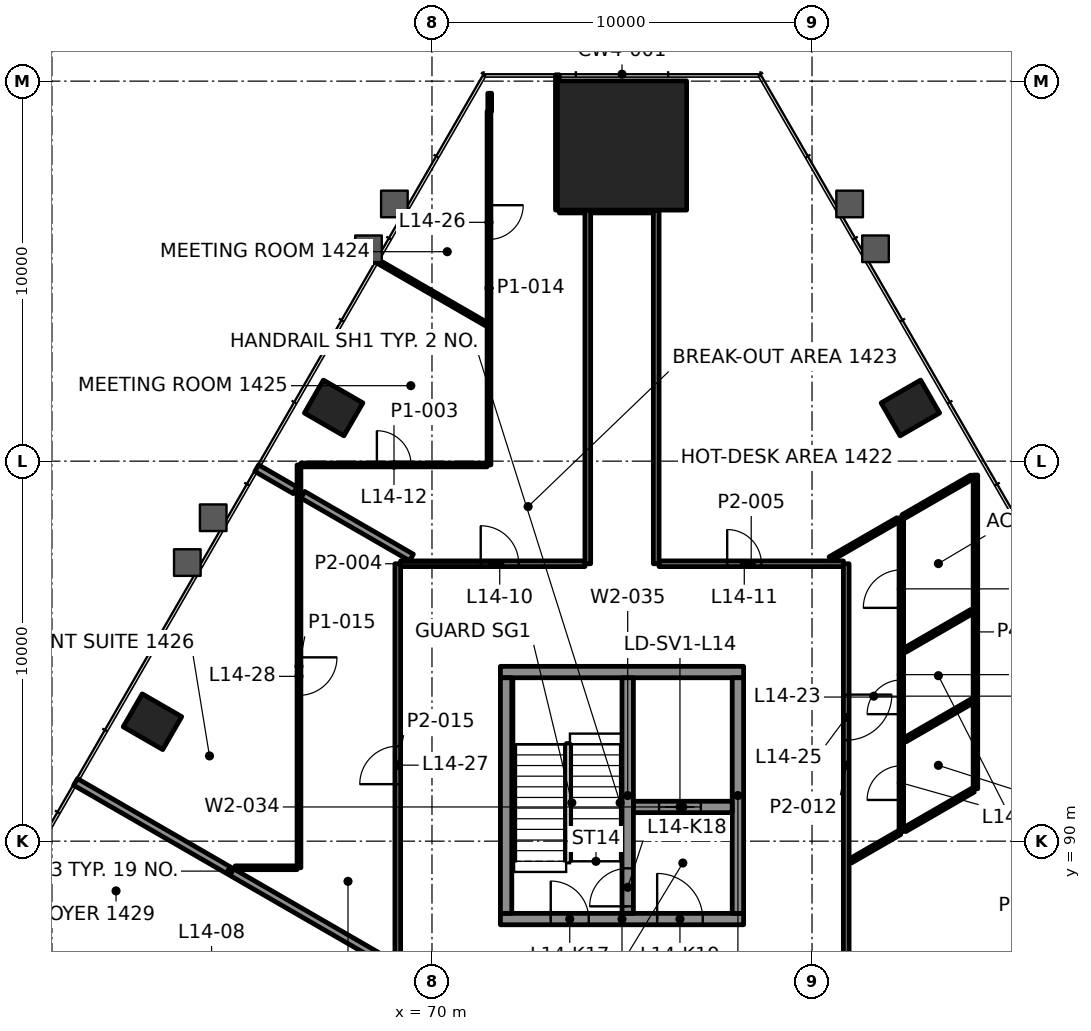
"""IFC4 building model, lengths in metres.
Left out: names, types, materials, properties, quantities, classifications, styles, units other than length and angle.
Written with IfcOpenShell. Run it as: python <this file> out.ifc"""

import sys

from ifc_helpers import new_model, si_unit, direction, frame, frame_2d, origin, origin_2d, place, context, subcontext, project, spatial, rectangle, extrude, element, fill, save


model = new_model("IFC4")
c1 = context("Model", 3, precision=1e-05, world=origin(), true_north=direction((0.0, 1.0)))
c2 = subcontext(c1, "Body", "Model", "MODEL_VIEW")
j1 = project(units=[si_unit("LENGTHUNIT", "METRE"), si_unit("PLANEANGLEUNIT", "RADIAN")], contexts=[c1])
p1 = place(None, origin())
s1 = spatial("IfcSite", under=j1, at=p1, CompositionType="ELEMENT")
p2 = place(p1, origin())
s2 = spatial("IfcBuilding", under=s1, at=p2, CompositionType="ELEMENT")
p3 = place(p2, frame((0.0, 0.0, 65.2)))
s3 = spatial("IfcBuildingStorey", under=s2, at=p3, CompositionType="ELEMENT", Elevation=65.2)
p4 = place(p3, frame((75.0, 108.307, 0.0), z_axis=(0.0, 0.0, 1.0), x_axis=(-1.0, 0.0, 0.0)))
e1 = element("IfcColumn", 1, at=p4, inside=s3, PredefinedType="COLUMN", context=c2, shape_type="SweptSolid", body=[
    extrude(rectangle(XDim=3.4, YDim=3.4, at=origin_2d()), origin(), (0.0, 0.0, 1.0), 4.2),
])
for number, where, z_axis, x_axis in (
    (2, (82.588, 101.4, -0.0), (0.0, 0.0, 1.0), (-0.5, 0.866, 0.0)),
    (3, (67.412, 101.4, -0.0), (0.0, 0.0, 1.0), (-0.5, -0.866, 0.0)),
    (4, (62.645, 93.143, -0.0), (0.0, 0.0, 1.0), (-0.5, -0.866, 0.0)),
):
    element("IfcColumn", number, at=place(p3, frame(where, z_axis=z_axis, x_axis=x_axis)), inside=s3, PredefinedType="COLUMN", context=c2, shape_type="SweptSolid", body=[
        extrude(rectangle(XDim=1.0, YDim=1.2, at=origin_2d()), origin(), (0.0, 0.0, 1.0), 4.2),
    ])
p5 = place(p3, frame((71.8, 87.95, 0.0), z_axis=(0.0, 0.0, 1.0), x_axis=(1.0, 0.0, 0.0)))
e5 = element("IfcWall", 5, at=p5, inside=s3, PredefinedType="SHEAR", context=c2, shape_type="SweptSolid", body=[
    extrude(rectangle(XDim=6.4, YDim=0.3, at=frame_2d((3.2, 0.0))), origin(), (0.0, 0.0, 1.0), 4.0),
])
p6 = place(p5, frame((1.325, 0.0, 0.0)))
e6 = element("IfcOpeningElement", 6, at=p6, cuts=e5, PredefinedType="OPENING", context=c2, shape_type="SweptSolid", body=[
    extrude(rectangle(XDim=1.0, YDim=2.1, at=frame_2d((0.5, 1.05))), frame((0.0, 0.16, 0.0), z_axis=(0.0, -1.0, 0.0), x_axis=(1.0, 0.0, 0.0)), (0.0, 0.0, 1.0), 0.32),
])
p7 = place(p5, frame((4.125, 0.0, 0.0)))
e7 = element("IfcOpeningElement", 7, at=p7, cuts=e5, PredefinedType="OPENING", context=c2, shape_type="SweptSolid", body=[
    extrude(rectangle(XDim=1.2, YDim=2.1, at=frame_2d((0.6, 1.05))), frame((0.0, 0.16, 0.0), z_axis=(0.0, -1.0, 0.0), x_axis=(1.0, 0.0, 0.0)), (0.0, 0.0, 1.0), 0.32),
])
p8 = place(p3, frame((71.8, 94.45, 0.0), z_axis=(0.0, 0.0, 1.0), x_axis=(1.0, 0.0, 0.0)))
e8 = element("IfcWall", 8, at=p8, inside=s3, PredefinedType="SHEAR", context=c2, shape_type="SweptSolid", body=[
    extrude(rectangle(XDim=6.4, YDim=0.3, at=frame_2d((3.2, 0.0))), origin(), (0.0, 0.0, 1.0), 4.0),
])
for number, where, z_axis, x_axis in (
    (9, (71.95, 88.1, 0.0), (0.0, 0.0, 1.0), (0.0, 1.0, 0.0)),
    (10, (78.05, 88.1, 0.0), (0.0, 0.0, 1.0), (0.0, 1.0, 0.0)),
):
    element("IfcWall", number, at=place(p3, frame(where, z_axis=z_axis, x_axis=x_axis)), inside=s3, PredefinedType="SHEAR", context=c2, shape_type="SweptSolid", body=[
        extrude(rectangle(XDim=6.2, YDim=0.3, at=frame_2d((3.1, 0.0))), origin(), (0.0, 0.0, 1.0), 4.0),
    ])
p9 = place(p3, frame((75.3, 90.9, 0.0), z_axis=(0.0, 0.0, 1.0), x_axis=(1.0, 0.0, 0.0)))
e11 = element("IfcWall", 11, at=p9, inside=s3, PredefinedType="SHEAR", context=c2, shape_type="SweptSolid", body=[
    extrude(rectangle(XDim=2.6, YDim=0.3, at=frame_2d((1.3, 0.0))), origin(), (0.0, 0.0, 1.0), 4.0),
])
p10 = place(p9, frame((0.675, 0.0, 0.0)))
e12 = element("IfcOpeningElement", 12, at=p10, cuts=e11, PredefinedType="OPENING", context=c2, shape_type="SweptSolid", body=[
    extrude(rectangle(XDim=1.1, YDim=2.1, at=frame_2d((0.55, 1.05))), frame((0.0, 0.16, 0.0), z_axis=(0.0, -1.0, 0.0), x_axis=(1.0, 0.0, 0.0)), (0.0, 0.0, 1.0), 0.32),
])
p11 = place(p3, frame((75.15, 88.1, 0.0), z_axis=(0.0, 0.0, 1.0), x_axis=(0.0, 1.0, 0.0)))
e13 = element("IfcWall", 13, at=p11, inside=s3, PredefinedType="SHEAR", context=c2, shape_type="SweptSolid", body=[
    extrude(rectangle(XDim=6.2, YDim=0.3, at=frame_2d((3.1, 0.0))), origin(), (0.0, 0.0, 1.0), 4.0),
])
p12 = place(p11, frame((0.185, 0.0, 0.0)))
e14 = element("IfcOpeningElement", 14, at=p12, cuts=e13, PredefinedType="OPENING", context=c2, shape_type="SweptSolid", body=[
    extrude(rectangle(XDim=1.0, YDim=2.1, at=frame_2d((0.5, 1.05))), frame((0.0, 0.16, 0.0), z_axis=(0.0, -1.0, 0.0), x_axis=(1.0, 0.0, 0.0)), (0.0, 0.0, 1.0), 0.32),
])
p13 = place(p3, frame((64.823, 89.3, 0.0), z_axis=(0.0, 0.0, 1.0), x_axis=(1.0, 0.0, 0.0)))
e15 = element("IfcWall", 15, at=p13, inside=s3, PredefinedType="PARTITIONING", context=c2, shape_type="SweptSolid", body=[
    extrude(rectangle(XDim=1.627, YDim=0.1, at=frame_2d((0.813, 0.0))), origin(), (0.0, 0.0, 1.0), 3.4),
])
p14 = place(p3, frame((69.175, 97.3, 0.0), z_axis=(0.0, 0.0, 1.0), x_axis=(1.0, 0.0, 0.0)))
e16 = element("IfcWall", 16, at=p14, inside=s3, PredefinedType="PARTITIONING", context=c2, shape_type="SweptSolid", body=[
    extrude(rectangle(XDim=4.85, YDim=0.15, at=frame_2d((2.425, 0.0))), origin(), (0.0, 0.0, 1.0), 3.4),
])
p15 = place(p14, frame((2.107, 0.0, 0.0)))
e17 = element("IfcOpeningElement", 17, at=p15, cuts=e16, PredefinedType="OPENING", context=c2, shape_type="SweptSolid", body=[
    extrude(rectangle(XDim=1.0, YDim=2.1, at=frame_2d((0.5, 1.05))), frame((0.0, 0.085, 0.0), z_axis=(0.0, -1.0, 0.0), x_axis=(1.0, 0.0, 0.0)), (0.0, 0.0, 1.0), 0.17),
])
p16 = place(p3, frame((75.975, 97.3, 0.0), z_axis=(0.0, 0.0, 1.0), x_axis=(1.0, 0.0, 0.0)))
e18 = element("IfcWall", 18, at=p16, inside=s3, PredefinedType="PARTITIONING", context=c2, shape_type="SweptSolid", body=[
    extrude(rectangle(XDim=4.85, YDim=0.15, at=frame_2d((2.425, 0.0))), origin(), (0.0, 0.0, 1.0), 3.4),
])
p17 = place(p16, frame((1.792, 0.0, 0.0)))
e19 = element("IfcOpeningElement", 19, at=p17, cuts=e18, PredefinedType="OPENING", context=c2, shape_type="SweptSolid", body=[
    extrude(rectangle(XDim=0.9, YDim=2.1, at=frame_2d((0.45, 1.05))), frame((0.0, 0.085, 0.0), z_axis=(0.0, -1.0, 0.0), x_axis=(1.0, 0.0, 0.0)), (0.0, 0.0, 1.0), 0.17),
])
p18 = place(p3, frame((66.551, 99.9, 0.0), z_axis=(0.0, 0.0, 1.0), x_axis=(1.0, 0.0, 0.0)))
e20 = element("IfcWall", 20, at=p18, inside=s3, PredefinedType="PARTITIONING", context=c2, shape_type="SweptSolid", body=[
    extrude(rectangle(XDim=4.899, YDim=0.1, at=frame_2d((2.45, 0.0))), origin(), (0.0, 0.0, 1.0), 3.165),
])
p19 = place(p18, frame((2.0, 0.0, 0.0)))
e21 = element("IfcOpeningElement", 21, at=p19, cuts=e20, PredefinedType="OPENING", context=c2, shape_type="SweptSolid", body=[
    extrude(rectangle(XDim=0.9, YDim=2.1, at=frame_2d((0.45, 1.05))), frame((0.0, 0.06, 0.0), z_axis=(0.0, -1.0, 0.0), x_axis=(1.0, 0.0, 0.0)), (0.0, 0.0, 1.0), 0.12),
])
p20 = place(p3, frame((73.351, 106.607, 0.0), z_axis=(0.0, 0.0, 1.0), x_axis=(1.0, 0.0, 0.0)))
e22 = element("IfcWall", 22, at=p20, inside=s3, PredefinedType="PARTITIONING", context=c2, shape_type="SweptSolid", body=[
    extrude(rectangle(XDim=0.674, YDim=0.15, at=frame_2d((0.337, 0.0))), origin(), (0.0, 0.0, 1.0), 3.4),
])
p21 = place(p3, frame((81.01, 89.479, 0.0), z_axis=(0.0, 0.0, 1.0), x_axis=(0.866055123991, 0.49994851956, 0.0)))
e23 = element("IfcWall", 23, at=p21, inside=s3, PredefinedType="PARTITIONING", context=c2, shape_type="SweptSolid", body=[
    extrude(rectangle(XDim=1.496, YDim=0.12, at=frame_2d((0.748, 0.0))), origin(), (0.0, 0.0, 1.0), 3.4),
])
for number, where, z_axis, x_axis in (
    (24, (82.445, 92.666, 0.0), (0.0, 0.0, 1.0), (0.866, 0.5, 0.0)),
    (25, (82.444, 95.026, 0.0), (0.0, 0.0, 1.0), (0.866, 0.5, 0.0)),
):
    element("IfcWall", number, at=place(p3, frame(where, z_axis=z_axis, x_axis=x_axis)), inside=s3, PredefinedType="PARTITIONING", context=c2, shape_type="SweptSolid", body=[
        extrude(rectangle(XDim=2.033, YDim=0.12, at=frame_2d((1.017, 0.0))), origin(), (0.0, 0.0, 1.0), 3.4),
    ])
p22 = place(p3, frame((80.479, 97.43, 0.0), z_axis=(0.0, 0.0, 1.0), x_axis=(0.866057052383, 0.499945179012, 0.0)))
e26 = element("IfcWall", 26, at=p22, inside=s3, PredefinedType="PARTITIONING", context=c2, shape_type="SweptSolid", body=[
    extrude(rectangle(XDim=2.056, YDim=0.12, at=frame_2d((1.028, 0.0))), origin(), (0.0, 0.0, 1.0), 3.4),
])
p23 = place(p3, frame((84.3, 91.379, 0.0), z_axis=(0.0, 0.0, 1.0), x_axis=(0.0, 1.0, 0.0)))
e27 = element("IfcWall", 27, at=p23, inside=s3, PredefinedType="PARTITIONING", context=c2, shape_type="SweptSolid", body=[
    extrude(rectangle(XDim=8.255, YDim=0.12, at=frame_2d((4.127, 0.0))), origin(), (0.0, 0.0, 1.0), 3.165),
])
p24 = place(p3, frame((82.35, 90.253, 0.0), z_axis=(0.0, 0.0, 1.0), x_axis=(0.0, 1.0, 0.0)))
e28 = element("IfcWall", 28, at=p24, inside=s3, PredefinedType="PARTITIONING", context=c2, shape_type="SweptSolid", body=[
    extrude(rectangle(XDim=8.257, YDim=0.12, at=frame_2d((4.128, 0.0))), origin(), (0.0, 0.0, 1.0), 3.4),
])
p25 = place(p24, frame((0.831, 0.0, 0.0)))
e29 = element("IfcOpeningElement", 29, at=p25, cuts=e28, PredefinedType="OPENING", context=c2, shape_type="SweptSolid", body=[
    extrude(rectangle(XDim=0.9, YDim=2.1, at=frame_2d((0.45, 1.05))), frame((0.0, 0.07, 0.0), z_axis=(0.0, -1.0, 0.0), x_axis=(1.0, 0.0, 0.0)), (0.0, 0.0, 1.0), 0.14),
])
p26 = place(p24, frame((3.089, 0.0, 0.0)))
e30 = element("IfcOpeningElement", 30, at=p26, cuts=e28, PredefinedType="OPENING", context=c2, shape_type="SweptSolid", body=[
    extrude(rectangle(XDim=0.9, YDim=2.1, at=frame_2d((0.45, 1.05))), frame((0.0, 0.07, 0.0), z_axis=(0.0, -1.0, 0.0), x_axis=(1.0, 0.0, 0.0)), (0.0, 0.0, 1.0), 0.14),
])
p27 = place(p24, frame((5.886, 0.0, 0.0)))
e31 = element("IfcOpeningElement", 31, at=p27, cuts=e28, PredefinedType="OPENING", context=c2, shape_type="SweptSolid", body=[
    extrude(rectangle(XDim=1.0, YDim=2.1, at=frame_2d((0.5, 1.05))), frame((0.0, 0.07, 0.0), z_axis=(0.0, -1.0, 0.0), x_axis=(1.0, 0.0, 0.0)), (0.0, 0.0, 1.0), 0.14),
])
p28 = place(p3, frame((80.9, 97.3, 0.0), z_axis=(0.0, 0.0, 1.0), x_axis=(0.0, -1.0, 0.0)))
e32 = element("IfcWall", 32, at=p28, inside=s3, PredefinedType="PARTITIONING", context=c2, shape_type="SweptSolid", body=[
    extrude(rectangle(XDim=10.6, YDim=0.15, at=frame_2d((5.3, 0.0))), origin(), (0.0, 0.0, 1.0), 3.4),
])
p29 = place(p28, frame((3.444, 0.0, 0.0)))
e33 = element("IfcOpeningElement", 33, at=p29, cuts=e32, PredefinedType="OPENING", context=c2, shape_type="SweptSolid", body=[
    extrude(rectangle(XDim=1.2, YDim=2.1, at=frame_2d((0.6, 1.05))), frame((0.0, 0.085, 0.0), z_axis=(0.0, -1.0, 0.0), x_axis=(1.0, 0.0, 0.0)), (0.0, 0.0, 1.0), 0.17),
])
p30 = place(p3, frame((75.9, 97.3, 0.0), z_axis=(0.0, 0.0, 1.0), x_axis=(0.0, 1.0, 0.0)))
e34 = element("IfcWall", 34, at=p30, inside=s3, PredefinedType="PARTITIONING", context=c2, shape_type="SweptSolid", body=[
    extrude(rectangle(XDim=9.306, YDim=0.15, at=frame_2d((4.653, 0.0))), origin(), (0.0, 0.0, 1.0), 3.4),
])
p31 = place(p3, frame((74.1, 97.3, 0.0), z_axis=(0.0, 0.0, 1.0), x_axis=(0.0, 1.0, 0.0)))
e35 = element("IfcWall", 35, at=p31, inside=s3, PredefinedType="PARTITIONING", context=c2, shape_type="SweptSolid", body=[
    extrude(rectangle(XDim=9.307, YDim=0.15, at=frame_2d((4.653, 0.0))), origin(), (0.0, 0.0, 1.0), 3.4),
])
p32 = place(p3, frame((73.3, 106.607, 0.0), z_axis=(0.0, 0.0, 1.0), x_axis=(0.0, 1.0, 0.0)))
e36 = element("IfcWall", 36, at=p32, inside=s3, PredefinedType="PARTITIONING", context=c2, shape_type="SweptSolid", body=[
    extrude(rectangle(XDim=3.56, YDim=0.1, at=frame_2d((1.78, 0.0))), origin(), (0.0, 0.0, 1.0), 3.4),
])
p33 = place(p3, frame((71.519, 109.207, 0.0), z_axis=(0.0, 0.0, 1.0), x_axis=(0.0, 1.0, 0.0)))
e37 = element("IfcWall", 37, at=p33, inside=s3, PredefinedType="PARTITIONING", context=c2, shape_type="SweptSolid", body=[
    extrude(rectangle(XDim=0.473, YDim=0.1, at=frame_2d((0.237, 0.0))), origin(), (0.0, 0.0, 1.0), 3.4),
])
p34 = place(p3, frame((71.5, 109.206, 0.0), z_axis=(0.0, 0.0, 1.0), x_axis=(0.0, -1.0, 0.0)))
e38 = element("IfcWall", 38, at=p34, inside=s3, PredefinedType="PARTITIONING", context=c2, shape_type="SweptSolid", body=[
    extrude(rectangle(XDim=9.306, YDim=0.1, at=frame_2d((4.653, 0.0))), origin(), (0.0, 0.0, 1.0), 3.4),
])
p35 = place(p34, frame((2.471, 0.0, 0.0)))
e39 = element("IfcOpeningElement", 39, at=p35, cuts=e38, PredefinedType="OPENING", context=c2, shape_type="SweptSolid", body=[
    extrude(rectangle(XDim=0.9, YDim=2.1, at=frame_2d((0.45, 1.05))), frame((0.0, 0.06, 0.0), z_axis=(0.0, -1.0, 0.0), x_axis=(1.0, 0.0, 0.0)), (0.0, 0.0, 1.0), 0.12),
])
p36 = place(p3, frame((69.1, 86.7, 0.0), z_axis=(0.0, 0.0, 1.0), x_axis=(0.0, 1.0, 0.0)))
e40 = element("IfcWall", 40, at=p36, inside=s3, PredefinedType="PARTITIONING", context=c2, shape_type="SweptSolid", body=[
    extrude(rectangle(XDim=10.6, YDim=0.15, at=frame_2d((5.3, 0.0))), origin(), (0.0, 0.0, 1.0), 3.4),
])
p37 = place(p36, frame((4.8, 0.0, 0.0)))
e41 = element("IfcOpeningElement", 41, at=p37, cuts=e40, PredefinedType="OPENING", context=c2, shape_type="SweptSolid", body=[
    extrude(rectangle(XDim=1.0, YDim=2.1, at=frame_2d((0.5, 1.05))), frame((0.0, 0.085, 0.0), z_axis=(0.0, -1.0, 0.0), x_axis=(1.0, 0.0, 0.0)), (0.0, 0.0, 1.0), 0.17),
])
p38 = place(p3, frame((66.5, 99.899, 0.0), z_axis=(0.0, 0.0, 1.0), x_axis=(0.0, -1.0, 0.0)))
e42 = element("IfcWall", 42, at=p38, inside=s3, PredefinedType="PARTITIONING", context=c2, shape_type="SweptSolid", body=[
    extrude(rectangle(XDim=10.599, YDim=0.1, at=frame_2d((5.3, 0.0))), origin(), (0.0, 0.0, 1.0), 3.165),
])
p39 = place(p38, frame((5.062, 0.0, 0.0)))
e43 = element("IfcOpeningElement", 43, at=p39, cuts=e42, PredefinedType="OPENING", context=c2, shape_type="SweptSolid", body=[
    extrude(rectangle(XDim=1.0, YDim=2.1, at=frame_2d((0.5, 1.05))), frame((0.0, 0.06, 0.0), z_axis=(0.0, -1.0, 0.0), x_axis=(1.0, 0.0, 0.0)), (0.0, 0.0, 1.0), 0.12),
])
p40 = place(p3, frame((71.424, 103.61, 0.0), z_axis=(0.0, 0.0, 1.0), x_axis=(-0.866004823592, 0.500035644245, 0.0)))
e44 = element("IfcWall", 44, at=p40, inside=s3, PredefinedType="PARTITIONING", context=c2, shape_type="SweptSolid", body=[
    extrude(rectangle(XDim=3.329, YDim=0.1, at=frame_2d((1.665, 0.0))), origin(), (0.0, 0.0, 1.0), 3.4),
])
p41 = place(p3, frame((69.46, 97.465, 0.0), z_axis=(0.0, 0.0, 1.0), x_axis=(-0.866027998537, 0.499995505729, 0.0)))
e45 = element("IfcWall", 45, at=p41, inside=s3, PredefinedType="PARTITIONING", context=c2, shape_type="SweptSolid", body=[
    extrude(rectangle(XDim=3.302, YDim=0.2, at=frame_2d((1.651, 0.0))), origin(), (0.0, 0.0, 1.0), 3.4),
])
p42 = place(p3, frame((68.751, 86.865, 0.0), z_axis=(0.0, 0.0, 1.0), x_axis=(-0.8660257632, 0.499999377474, 0.0)))
e46 = element("IfcWall", 46, at=p42, inside=s3, PredefinedType="PARTITIONING", context=c2, shape_type="SweptSolid", body=[
    extrude(rectangle(XDim=9.387, YDim=0.2, at=frame_2d((4.693, 0.0))), origin(), (0.0, 0.0, 1.0), 3.165),
])
p43 = place(p3, frame((74.175, 106.607, 0.0), z_axis=(0.0, 0.0, 1.0), x_axis=(1.0, 0.0, 0.0)))
e47 = element("IfcWall", 47, at=p43, inside=s3, PredefinedType="PARTITIONING", context=c2, shape_type="SweptSolid", body=[
    extrude(rectangle(XDim=1.649, YDim=0.15, at=frame_2d((0.825, 0.0))), origin(), (0.0, 0.0, 1.0), 3.397),
])
p44 = place(p3, frame((82.44, 90.304, 0.0), z_axis=(0.0, 0.0, 1.0), x_axis=(0.866044773228, 0.499966449638, 0.0)))
e48 = element("IfcWall", 48, at=p44, inside=s3, PredefinedType="PARTITIONING", context=c2, shape_type="SweptSolid", body=[
    extrude(rectangle(XDim=2.079, YDim=0.12, at=frame_2d((1.04, 0.0))), origin(), (0.0, 0.0, 1.0), 3.4),
])
p45 = place(p3, frame((82.395, 98.536, 0.0), z_axis=(0.0, 0.0, 1.0), x_axis=(0.866041603473, 0.499971940267, 0.0)))
e49 = element("IfcWall", 49, at=p45, inside=s3, PredefinedType="PARTITIONING", context=c2, shape_type="SweptSolid", body=[
    extrude(rectangle(XDim=2.089, YDim=0.12, at=frame_2d((1.045, 0.0))), origin(), (0.0, 0.0, 1.0), 3.165),
])
p46 = place(p3, frame((66.4, 99.231, 0.0), z_axis=(0.0, 0.0, 1.0), x_axis=(-0.86600796803, 0.500030198396, 0.0)))
e50 = element("IfcWall", 50, at=p46, inside=s3, PredefinedType="PARTITIONING", context=c2, shape_type="SweptSolid", body=[
    extrude(rectangle(XDim=1.167, YDim=0.2, at=frame_2d((0.584, 0.0))), origin(), (0.0, 0.0, 1.0), 3.165),
])
p47 = place(p15, origin())
e51 = element("IfcDoor", 51, at=p47, inside=s3, OperationType="SINGLE_SWING_RIGHT", PredefinedType="DOOR", context=c2, shape_type="SweptSolid", body=[
    extrude(rectangle(XDim=1.0, YDim=2.1, at=frame_2d((0.5, 1.05))), frame((0.0, 0.025, 0.0), z_axis=(0.0, -1.0, 0.0), x_axis=(1.0, 0.0, 0.0)), (0.0, 0.0, 1.0), 0.05),
])
fill(e17, e51)
p48 = place(p17, origin())
e52 = element("IfcDoor", 52, at=p48, inside=s3, OperationType="SINGLE_SWING_LEFT", PredefinedType="DOOR", context=c2, shape_type="SweptSolid", body=[
    extrude(rectangle(XDim=0.9, YDim=2.1, at=frame_2d((0.45, 1.05))), frame((0.0, 0.025, 0.0), z_axis=(0.0, -1.0, 0.0), x_axis=(1.0, 0.0, 0.0)), (0.0, 0.0, 1.0), 0.05),
])
fill(e19, e52)
p49 = place(p19, origin())
e53 = element("IfcDoor", 53, at=p49, inside=s3, OperationType="SINGLE_SWING_RIGHT", PredefinedType="DOOR", context=c2, shape_type="SweptSolid", body=[
    extrude(rectangle(XDim=0.9, YDim=2.1, at=frame_2d((0.45, 1.05))), frame((0.0, 0.025, 0.0), z_axis=(0.0, -1.0, 0.0), x_axis=(1.0, 0.0, 0.0)), (0.0, 0.0, 1.0), 0.05),
])
fill(e21, e53)
p50 = place(p25, origin())
e54 = element("IfcDoor", 54, at=p50, inside=s3, OperationType="SINGLE_SWING_RIGHT", PredefinedType="DOOR", context=c2, shape_type="SweptSolid", body=[
    extrude(rectangle(XDim=0.9, YDim=2.1, at=frame_2d((0.45, 1.05))), frame((0.0, 0.025, 0.0), z_axis=(0.0, -1.0, 0.0), x_axis=(1.0, 0.0, 0.0)), (0.0, 0.0, 1.0), 0.05),
])
fill(e29, e54)
p51 = place(p26, origin())
e55 = element("IfcDoor", 55, at=p51, inside=s3, OperationType="SINGLE_SWING_LEFT", PredefinedType="DOOR", context=c2, shape_type="SweptSolid", body=[
    extrude(rectangle(XDim=0.9, YDim=2.1, at=frame_2d((0.45, 1.05))), frame((0.0, 0.025, 0.0), z_axis=(0.0, -1.0, 0.0), x_axis=(1.0, 0.0, 0.0)), (0.0, 0.0, 1.0), 0.05),
])
fill(e30, e55)
p52 = place(p27, origin())
e56 = element("IfcDoor", 56, at=p52, inside=s3, OperationType="SINGLE_SWING_RIGHT", PredefinedType="DOOR", context=c2, shape_type="SweptSolid", body=[
    extrude(rectangle(XDim=1.0, YDim=2.1, at=frame_2d((0.5, 1.05))), frame((0.0, 0.025, 0.0), z_axis=(0.0, -1.0, 0.0), x_axis=(1.0, 0.0, 0.0)), (0.0, 0.0, 1.0), 0.05),
])
fill(e31, e56)
p53 = place(p29, origin())
e57 = element("IfcDoor", 57, at=p53, inside=s3, OperationType="DOUBLE_DOOR_SINGLE_SWING", PredefinedType="DOOR", context=c2, shape_type="SweptSolid", body=[
    extrude(rectangle(XDim=1.2, YDim=2.1, at=frame_2d((0.6, 1.05))), frame((0.0, 0.025, 0.0), z_axis=(0.0, -1.0, 0.0), x_axis=(1.0, 0.0, 0.0)), (0.0, 0.0, 1.0), 0.05),
])
fill(e33, e57)
p54 = place(p35, origin())
e58 = element("IfcDoor", 58, at=p54, inside=s3, OperationType="SINGLE_SWING_RIGHT", PredefinedType="DOOR", context=c2, shape_type="SweptSolid", body=[
    extrude(rectangle(XDim=0.9, YDim=2.1, at=frame_2d((0.45, 1.05))), frame((0.0, 0.025, 0.0), z_axis=(0.0, -1.0, 0.0), x_axis=(1.0, 0.0, 0.0)), (0.0, 0.0, 1.0), 0.05),
])
fill(e39, e58)
p55 = place(p37, origin())
e59 = element("IfcDoor", 59, at=p55, inside=s3, OperationType="SINGLE_SWING_RIGHT", PredefinedType="DOOR", context=c2, shape_type="SweptSolid", body=[
    extrude(rectangle(XDim=1.0, YDim=2.1, at=frame_2d((0.5, 1.05))), frame((0.0, 0.025, 0.0), z_axis=(0.0, -1.0, 0.0), x_axis=(1.0, 0.0, 0.0)), (0.0, 0.0, 1.0), 0.05),
])
fill(e41, e59)
p56 = place(p39, origin())
e60 = element("IfcDoor", 60, at=p56, inside=s3, OperationType="SINGLE_SWING_RIGHT", PredefinedType="DOOR", context=c2, shape_type="SweptSolid", body=[
    extrude(rectangle(XDim=1.0, YDim=2.1, at=frame_2d((0.5, 1.05))), frame((0.0, 0.025, 0.0), z_axis=(0.0, -1.0, 0.0), x_axis=(1.0, 0.0, 0.0)), (0.0, 0.0, 1.0), 0.05),
])
fill(e43, e60)
p57 = place(p10, origin())
e61 = element("IfcDoor", 61, at=p57, inside=s3, OperationType="DOUBLE_DOOR_SLIDING", PredefinedType="DOOR", context=c2, shape_type="SweptSolid", body=[
    extrude(rectangle(XDim=1.1, YDim=2.1, at=frame_2d((0.55, 1.05))), frame((0.0, 0.025, 0.0), z_axis=(0.0, -1.0, 0.0), x_axis=(1.0, 0.0, 0.0)), (0.0, 0.0, 1.0), 0.05),
])
fill(e12, e61)
p58 = place(p6, origin())
e62 = element("IfcDoor", 62, at=p58, inside=s3, OperationType="SINGLE_SWING_RIGHT", PredefinedType="DOOR", context=c2, shape_type="SweptSolid", body=[
    extrude(rectangle(XDim=1.0, YDim=2.1, at=frame_2d((0.5, 1.05))), frame((0.0, 0.025, 0.0), z_axis=(0.0, -1.0, 0.0), x_axis=(1.0, 0.0, 0.0)), (0.0, 0.0, 1.0), 0.05),
])
fill(e6, e62)
p59 = place(p12, origin())
e63 = element("IfcDoor", 63, at=p59, inside=s3, OperationType="SINGLE_SWING_LEFT", PredefinedType="DOOR", context=c2, shape_type="SweptSolid", body=[
    extrude(rectangle(XDim=1.0, YDim=2.1, at=frame_2d((0.5, 1.05))), frame((0.0, 0.025, 0.0), z_axis=(0.0, -1.0, 0.0), x_axis=(1.0, 0.0, 0.0)), (0.0, 0.0, 1.0), 0.05),
])
fill(e14, e63)
p60 = place(p7, origin())
e64 = element("IfcDoor", 64, at=p60, inside=s3, OperationType="SINGLE_SWING_RIGHT", PredefinedType="DOOR", context=c2, shape_type="SweptSolid", body=[
    extrude(rectangle(XDim=1.2, YDim=2.1, at=frame_2d((0.6, 1.05))), frame((0.0, 0.025, 0.0), z_axis=(0.0, -1.0, 0.0), x_axis=(1.0, 0.0, 0.0)), (0.0, 0.0, 1.0), 0.05),
])
fill(e7, e64)
save(model, sys.argv[1])
